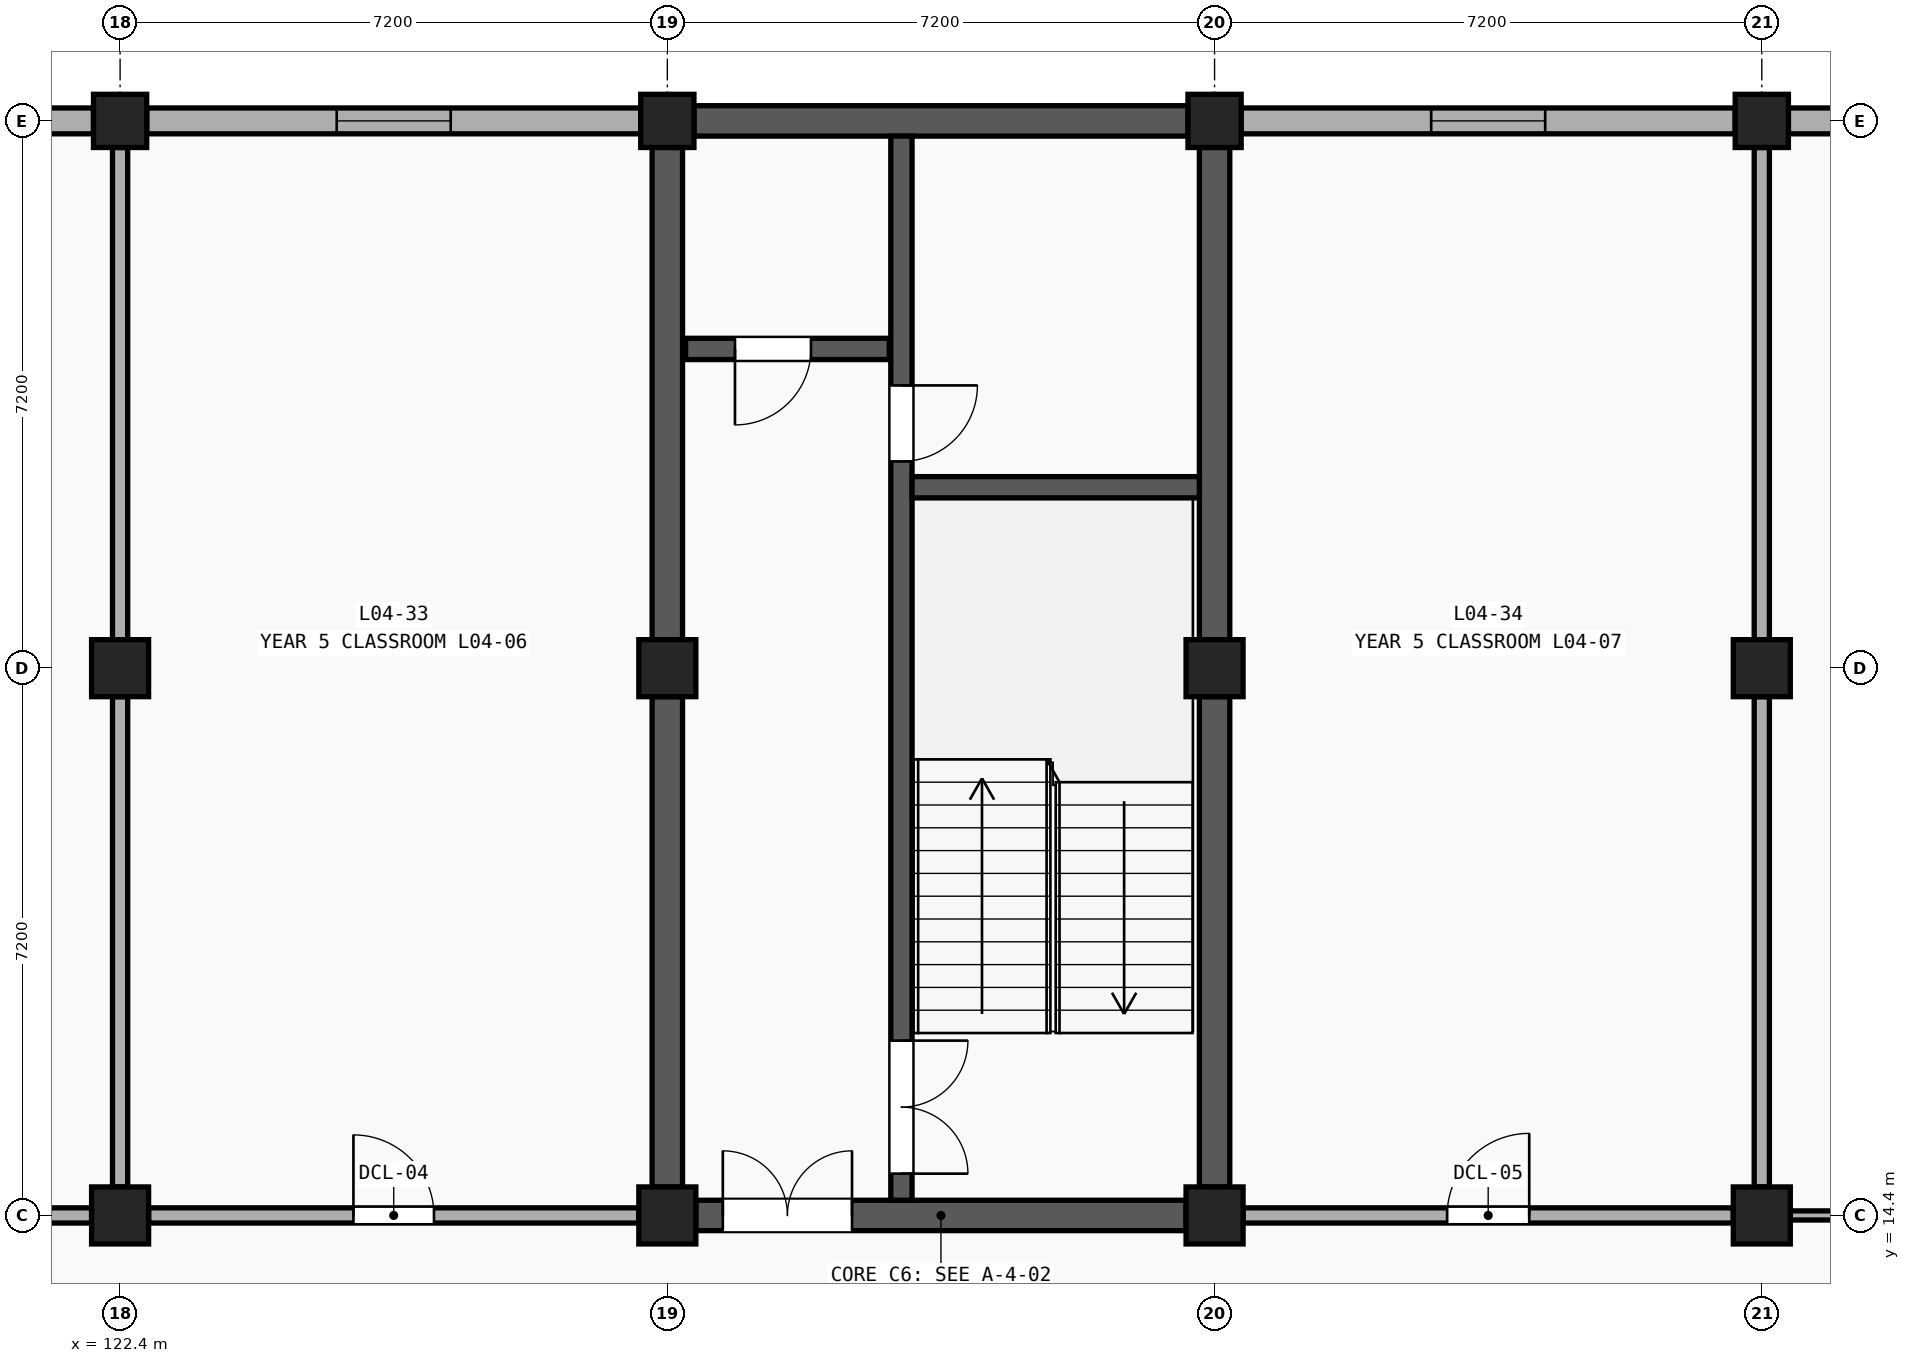
"""IFC4 building model, lengths in metres.
Left out: names, types, materials, properties, quantities, classifications, styles, units other than length and angle.
Written with IfcOpenShell. Run it as: python <this file> out.ifc"""

import sys

from ifc_helpers import new_model, si_unit, direction, frame, frame_2d, origin, origin_2d, place, context, subcontext, project, spatial, rectangle, extrude, element, fill, save


model = new_model("IFC4")
c1 = context("Model", 3, precision=1e-05, world=origin(), true_north=direction((0.0, 1.0)))
c2 = subcontext(c1, "Body", "Model", "MODEL_VIEW")
j1 = project(units=[si_unit("LENGTHUNIT", "METRE"), si_unit("PLANEANGLEUNIT", "RADIAN")], contexts=[c1])
p1 = place(None, origin())
s1 = spatial("IfcSite", under=j1, at=p1, CompositionType="ELEMENT")
p2 = place(p1, origin())
s2 = spatial("IfcBuilding", under=s1, at=p2, CompositionType="ELEMENT")
p3 = place(p2, frame((0.0, 0.0, 18.6)))
s3 = spatial("IfcBuildingStorey", under=s2, at=p3, CompositionType="ELEMENT", Elevation=18.6)
for number, where, z_axis, x_axis in (
    (1, (122.4, 14.4, 0.0), (0.0, 0.0, 1.0), (1.0, 0.0, 0.0)),
    (2, (122.4, 21.6, 0.0), (0.0, 0.0, 1.0), (1.0, 0.0, 0.0)),
):
    element("IfcColumn", number, at=place(p3, frame(where, z_axis=z_axis, x_axis=x_axis)), inside=s3, PredefinedType="COLUMN", context=c2, shape_type="SweptSolid", body=[
        extrude(rectangle(XDim=0.75, YDim=0.75, at=origin_2d()), origin(), (0.0, 0.0, 1.0), 4.0),
    ])
p4 = place(p3, frame((122.4, 28.8, 0.0), z_axis=(0.0, 0.0, 1.0), x_axis=(1.0, 0.0, 0.0)))
e3 = element("IfcColumn", 3, at=p4, inside=s3, PredefinedType="COLUMN", context=c2, shape_type="SweptSolid", body=[
    extrude(rectangle(XDim=0.7, YDim=0.7, at=origin_2d()), origin(), (0.0, 0.0, 1.0), 4.0),
])
for number, where, z_axis, x_axis in (
    (4, (129.6, 14.4, 0.0), (0.0, 0.0, 1.0), (1.0, 0.0, 0.0)),
    (5, (129.6, 21.6, 0.0), (0.0, 0.0, 1.0), (1.0, 0.0, 0.0)),
):
    element("IfcColumn", number, at=place(p3, frame(where, z_axis=z_axis, x_axis=x_axis)), inside=s3, PredefinedType="COLUMN", context=c2, shape_type="SweptSolid", body=[
        extrude(rectangle(XDim=0.75, YDim=0.75, at=origin_2d()), origin(), (0.0, 0.0, 1.0), 4.0),
    ])
p5 = place(p3, frame((129.6, 28.8, 0.0), z_axis=(0.0, 0.0, 1.0), x_axis=(1.0, 0.0, 0.0)))
e6 = element("IfcColumn", 6, at=p5, inside=s3, PredefinedType="COLUMN", context=c2, shape_type="SweptSolid", body=[
    extrude(rectangle(XDim=0.7, YDim=0.7, at=origin_2d()), origin(), (0.0, 0.0, 1.0), 4.0),
])
for number, where, z_axis, x_axis in (
    (7, (136.8, 14.4, 0.0), (0.0, 0.0, 1.0), (1.0, 0.0, 0.0)),
    (8, (136.8, 21.6, 0.0), (0.0, 0.0, 1.0), (1.0, 0.0, 0.0)),
):
    element("IfcColumn", number, at=place(p3, frame(where, z_axis=z_axis, x_axis=x_axis)), inside=s3, PredefinedType="COLUMN", context=c2, shape_type="SweptSolid", body=[
        extrude(rectangle(XDim=0.75, YDim=0.75, at=origin_2d()), origin(), (0.0, 0.0, 1.0), 4.0),
    ])
p6 = place(p3, frame((136.8, 28.8, 0.0), z_axis=(0.0, 0.0, 1.0), x_axis=(1.0, 0.0, 0.0)))
e9 = element("IfcColumn", 9, at=p6, inside=s3, PredefinedType="COLUMN", context=c2, shape_type="SweptSolid", body=[
    extrude(rectangle(XDim=0.7, YDim=0.7, at=origin_2d()), origin(), (0.0, 0.0, 1.0), 4.0),
])
for number, where, z_axis, x_axis in (
    (10, (144.0, 14.4, 0.0), (0.0, 0.0, 1.0), (1.0, 0.0, 0.0)),
    (11, (144.0, 21.6, 0.0), (0.0, 0.0, 1.0), (1.0, 0.0, 0.0)),
):
    element("IfcColumn", number, at=place(p3, frame(where, z_axis=z_axis, x_axis=x_axis)), inside=s3, PredefinedType="COLUMN", context=c2, shape_type="SweptSolid", body=[
        extrude(rectangle(XDim=0.75, YDim=0.75, at=origin_2d()), origin(), (0.0, 0.0, 1.0), 4.0),
    ])
p7 = place(p3, frame((144.0, 28.8, 0.0), z_axis=(0.0, 0.0, 1.0), x_axis=(1.0, 0.0, 0.0)))
e12 = element("IfcColumn", 12, at=p7, inside=s3, PredefinedType="COLUMN", context=c2, shape_type="SweptSolid", body=[
    extrude(rectangle(XDim=0.7, YDim=0.7, at=origin_2d()), origin(), (0.0, 0.0, 1.0), 4.0),
])
p8 = place(p3, frame((115.45, 28.8, 0.0), z_axis=(0.0, 0.0, 1.0), x_axis=(1.0, 0.0, 0.0)))
e13 = element("IfcWall", 13, at=p8, inside=s3, PredefinedType="SOLIDWALL", context=c2, shape_type="SweptSolid", body=[
    extrude(rectangle(XDim=6.6, YDim=0.34, at=frame_2d((3.3, 0.0))), origin(), (0.0, 0.0, 1.0), 3.11),
])
p9 = place(p8, frame((2.55, 0.0, 1.1)))
e14 = element("IfcOpeningElement", 14, at=p9, cuts=e13, PredefinedType="OPENING", context=c2, shape_type="SweptSolid", body=[
    extrude(rectangle(XDim=1.5, YDim=1.35, at=frame_2d((0.75, 0.675))), frame((0.0, 0.182, 0.0), z_axis=(0.0, -1.0, 0.0), x_axis=(1.0, 0.0, 0.0)), (0.0, 0.0, 1.0), 0.364),
])
p10 = place(p3, frame((122.75, 28.8, 0.0), z_axis=(0.0, 0.0, 1.0), x_axis=(1.0, 0.0, 0.0)))
e15 = element("IfcWall", 15, at=p10, inside=s3, PredefinedType="SOLIDWALL", context=c2, shape_type="SweptSolid", body=[
    extrude(rectangle(XDim=6.5, YDim=0.34, at=frame_2d((3.25, 0.0))), origin(), (0.0, 0.0, 1.0), 3.11),
])
p11 = place(p10, frame((2.5, 0.0, 1.1)))
e16 = element("IfcOpeningElement", 16, at=p11, cuts=e15, PredefinedType="OPENING", context=c2, shape_type="SweptSolid", body=[
    extrude(rectangle(XDim=1.5, YDim=1.35, at=frame_2d((0.75, 0.675))), frame((0.0, 0.182, 0.0), z_axis=(0.0, -1.0, 0.0), x_axis=(1.0, 0.0, 0.0)), (0.0, 0.0, 1.0), 0.364),
])
p12 = place(p3, frame((137.15, 28.8, 0.0), z_axis=(0.0, 0.0, 1.0), x_axis=(1.0, 0.0, 0.0)))
e17 = element("IfcWall", 17, at=p12, inside=s3, PredefinedType="SOLIDWALL", context=c2, shape_type="SweptSolid", body=[
    extrude(rectangle(XDim=6.5, YDim=0.34, at=frame_2d((3.25, 0.0))), origin(), (0.0, 0.0, 1.0), 3.11),
])
p13 = place(p12, frame((2.5, 0.0, 1.1)))
e18 = element("IfcOpeningElement", 18, at=p13, cuts=e17, PredefinedType="OPENING", context=c2, shape_type="SweptSolid", body=[
    extrude(rectangle(XDim=1.5, YDim=1.35, at=frame_2d((0.75, 0.675))), frame((0.0, 0.182, 0.0), z_axis=(0.0, -1.0, 0.0), x_axis=(1.0, 0.0, 0.0)), (0.0, 0.0, 1.0), 0.364),
])
p14 = place(p3, frame((144.35, 28.8, 0.0), z_axis=(0.0, 0.0, 1.0), x_axis=(1.0, 0.0, 0.0)))
e19 = element("IfcWall", 19, at=p14, inside=s3, PredefinedType="SOLIDWALL", context=c2, shape_type="SweptSolid", body=[
    extrude(rectangle(XDim=6.6, YDim=0.34, at=frame_2d((3.3, 0.0))), origin(), (0.0, 0.0, 1.0), 3.11),
])
p15 = place(p14, frame((2.55, 0.0, 1.1)))
e20 = element("IfcOpeningElement", 20, at=p15, cuts=e19, PredefinedType="OPENING", context=c2, shape_type="SweptSolid", body=[
    extrude(rectangle(XDim=1.5, YDim=1.35, at=frame_2d((0.75, 0.675))), frame((0.0, 0.182, 0.0), z_axis=(0.0, -1.0, 0.0), x_axis=(1.0, 0.0, 0.0)), (0.0, 0.0, 1.0), 0.364),
])
p16 = place(p3, frame((129.6, 14.775, 0.0), z_axis=(0.0, 0.0, 1.0), x_axis=(0.0, 1.0, 0.0)))
e21 = element("IfcWall", 21, at=p16, inside=s3, PredefinedType="SHEAR", context=c2, shape_type="SweptSolid", body=[
    extrude(rectangle(XDim=6.45, YDim=0.4, at=frame_2d((3.225, 0.0))), origin(), (0.0, 0.0, 1.0), 2.97),
])
p17 = place(p3, frame((129.6, 21.975, 0.0), z_axis=(0.0, 0.0, 1.0), x_axis=(0.0, 1.0, 0.0)))
e22 = element("IfcWall", 22, at=p17, inside=s3, PredefinedType="SHEAR", context=c2, shape_type="SweptSolid", body=[
    extrude(rectangle(XDim=6.475, YDim=0.4, at=frame_2d((3.237, 0.0))), origin(), (0.0, 0.0, 1.0), 2.97),
])
p18 = place(p3, frame((136.8, 14.775, 0.0), z_axis=(0.0, 0.0, 1.0), x_axis=(0.0, 1.0, 0.0)))
e23 = element("IfcWall", 23, at=p18, inside=s3, PredefinedType="SHEAR", context=c2, shape_type="SweptSolid", body=[
    extrude(rectangle(XDim=6.45, YDim=0.4, at=frame_2d((3.225, 0.0))), origin(), (0.0, 0.0, 1.0), 2.97),
])
p19 = place(p3, frame((136.8, 21.975, 0.0), z_axis=(0.0, 0.0, 1.0), x_axis=(0.0, 1.0, 0.0)))
e24 = element("IfcWall", 24, at=p19, inside=s3, PredefinedType="SHEAR", context=c2, shape_type="SweptSolid", body=[
    extrude(rectangle(XDim=6.475, YDim=0.4, at=frame_2d((3.237, 0.0))), origin(), (0.0, 0.0, 1.0), 2.97),
])
p20 = place(p3, frame((129.975, 14.4, 0.0), z_axis=(0.0, 0.0, 1.0), x_axis=(1.0, 0.0, 0.0)))
e25 = element("IfcWall", 25, at=p20, inside=s3, PredefinedType="SHEAR", context=c2, shape_type="SweptSolid", body=[
    extrude(rectangle(XDim=6.45, YDim=0.4, at=frame_2d((3.225, 0.0))), origin(), (0.0, 0.0, 1.0), 3.04),
])
p21 = place(p20, frame((0.355, 0.0, 0.0)))
e26 = element("IfcOpeningElement", 26, at=p21, cuts=e25, PredefinedType="OPENING", context=c2, shape_type="SweptSolid", body=[
    extrude(rectangle(XDim=1.7, YDim=2.25, at=frame_2d((0.85, 1.125))), frame((0.0, 0.212, 0.0), z_axis=(0.0, -1.0, 0.0), x_axis=(1.0, 0.0, 0.0)), (0.0, 0.0, 1.0), 0.424),
])
p22 = place(p3, frame((129.95, 28.8, 0.0), z_axis=(0.0, 0.0, 1.0), x_axis=(1.0, 0.0, 0.0)))
e27 = element("IfcWall", 27, at=p22, inside=s3, PredefinedType="SHEAR", context=c2, shape_type="SweptSolid", body=[
    extrude(rectangle(XDim=6.5, YDim=0.4, at=frame_2d((3.25, 0.0))), origin(), (0.0, 0.0, 1.0), 3.11),
])
p23 = place(p3, frame((132.68, 14.6, 0.0), z_axis=(0.0, 0.0, 1.0), x_axis=(0.0, 1.0, 0.0)))
e28 = element("IfcWall", 28, at=p23, inside=s3, PredefinedType="SHEAR", context=c2, shape_type="SweptSolid", body=[
    extrude(rectangle(XDim=14.0, YDim=0.28, at=frame_2d((7.0, 0.0))), origin(), (0.0, 0.0, 1.0), 3.74),
])
p24 = place(p23, frame((0.35, 0.0, 0.0)))
e29 = element("IfcOpeningElement", 29, at=p24, cuts=e28, PredefinedType="OPENING", context=c2, shape_type="SweptSolid", body=[
    extrude(rectangle(XDim=1.75, YDim=2.15, at=frame_2d((0.875, 1.075))), frame((0.0, 0.152, 0.0), z_axis=(0.0, -1.0, 0.0), x_axis=(1.0, 0.0, 0.0)), (0.0, 0.0, 1.0), 0.304),
])
p25 = place(p23, frame((9.72, 0.0, 0.0)))
e30 = element("IfcOpeningElement", 30, at=p25, cuts=e28, PredefinedType="OPENING", context=c2, shape_type="SweptSolid", body=[
    extrude(rectangle(XDim=1.0, YDim=2.15, at=frame_2d((0.5, 1.075))), frame((0.0, 0.152, 0.0), z_axis=(0.0, -1.0, 0.0), x_axis=(1.0, 0.0, 0.0)), (0.0, 0.0, 1.0), 0.304),
])
p26 = place(p3, frame((132.82, 23.98, 0.0), z_axis=(0.0, 0.0, 1.0), x_axis=(1.0, 0.0, 0.0)))
e31 = element("IfcWall", 31, at=p26, inside=s3, PredefinedType="SHEAR", context=c2, shape_type="SweptSolid", body=[
    extrude(rectangle(XDim=3.78, YDim=0.28, at=frame_2d((1.89, 0.0))), origin(), (0.0, 0.0, 1.0), 3.74),
])
p27 = place(p3, frame((129.84, 25.8, 0.0), z_axis=(0.0, 0.0, 1.0), x_axis=(1.0, 0.0, 0.0)))
e32 = element("IfcWall", 32, at=p27, inside=s3, PredefinedType="SHEAR", context=c2, shape_type="SweptSolid", body=[
    extrude(rectangle(XDim=2.68, YDim=0.28, at=frame_2d((1.34, 0.0))), origin(), (0.0, 0.0, 1.0), 3.74),
])
p28 = place(p27, frame((0.65, 0.0, 0.0)))
e33 = element("IfcOpeningElement", 33, at=p28, cuts=e32, PredefinedType="OPENING", context=c2, shape_type="SweptSolid", body=[
    extrude(rectangle(XDim=1.0, YDim=2.15, at=frame_2d((0.5, 1.075))), frame((0.0, 0.152, 0.0), z_axis=(0.0, -1.0, 0.0), x_axis=(1.0, 0.0, 0.0)), (0.0, 0.0, 1.0), 0.304),
])
p29 = place(p3, frame((115.575, 14.4, 0.0), z_axis=(0.0, 0.0, 1.0), x_axis=(1.0, 0.0, 0.0)))
e34 = element("IfcWall", 34, at=p29, inside=s3, PredefinedType="PARTITIONING", context=c2, shape_type="SweptSolid", body=[
    extrude(rectangle(XDim=6.45, YDim=0.2, at=frame_2d((3.225, 0.0))), origin(), (0.0, 0.0, 1.0), 2.97),
])
p30 = place(p29, frame((2.705, 0.0, 0.0)))
e35 = element("IfcOpeningElement", 35, at=p30, cuts=e34, PredefinedType="OPENING", context=c2, shape_type="SweptSolid", body=[
    extrude(rectangle(XDim=1.04, YDim=2.14, at=frame_2d((0.52, 1.07))), frame((0.0, 0.112, 0.0), z_axis=(0.0, -1.0, 0.0), x_axis=(1.0, 0.0, 0.0)), (0.0, 0.0, 1.0), 0.224),
])
p31 = place(p3, frame((122.4, 14.775, 0.0), z_axis=(0.0, 0.0, 1.0), x_axis=(0.0, 1.0, 0.0)))
e36 = element("IfcWall", 36, at=p31, inside=s3, PredefinedType="PARTITIONING", context=c2, shape_type="SweptSolid", body=[
    extrude(rectangle(XDim=6.45, YDim=0.2, at=frame_2d((3.225, 0.0))), origin(), (0.0, 0.0, 1.0), 2.97),
])
p32 = place(p3, frame((122.4, 21.975, 0.0), z_axis=(0.0, 0.0, 1.0), x_axis=(0.0, 1.0, 0.0)))
e37 = element("IfcWall", 37, at=p32, inside=s3, PredefinedType="PARTITIONING", context=c2, shape_type="SweptSolid", body=[
    extrude(rectangle(XDim=6.475, YDim=0.2, at=frame_2d((3.237, 0.0))), origin(), (0.0, 0.0, 1.0), 2.97),
])
p33 = place(p3, frame((122.775, 14.4, 0.0), z_axis=(0.0, 0.0, 1.0), x_axis=(1.0, 0.0, 0.0)))
e38 = element("IfcWall", 38, at=p33, inside=s3, PredefinedType="PARTITIONING", context=c2, shape_type="SweptSolid", body=[
    extrude(rectangle(XDim=6.45, YDim=0.2, at=frame_2d((3.225, 0.0))), origin(), (0.0, 0.0, 1.0), 2.97),
])
p34 = place(p33, frame((2.695, 0.0, 0.0)))
e39 = element("IfcOpeningElement", 39, at=p34, cuts=e38, PredefinedType="OPENING", context=c2, shape_type="SweptSolid", body=[
    extrude(rectangle(XDim=1.06, YDim=2.16, at=frame_2d((0.53, 1.08))), frame((0.0, 0.112, 0.0), z_axis=(0.0, -1.0, 0.0), x_axis=(1.0, 0.0, 0.0)), (0.0, 0.0, 1.0), 0.224),
])
p35 = place(p3, frame((137.175, 14.4, 0.0), z_axis=(0.0, 0.0, 1.0), x_axis=(1.0, 0.0, 0.0)))
e40 = element("IfcWall", 40, at=p35, inside=s3, PredefinedType="PARTITIONING", context=c2, shape_type="SweptSolid", body=[
    extrude(rectangle(XDim=6.45, YDim=0.2, at=frame_2d((3.225, 0.0))), origin(), (0.0, 0.0, 1.0), 2.97),
])
p36 = place(p35, frame((2.685, 0.0, 0.0)))
e41 = element("IfcOpeningElement", 41, at=p36, cuts=e40, PredefinedType="OPENING", context=c2, shape_type="SweptSolid", body=[
    extrude(rectangle(XDim=1.08, YDim=2.18, at=frame_2d((0.54, 1.09))), frame((0.0, 0.112, 0.0), z_axis=(0.0, -1.0, 0.0), x_axis=(1.0, 0.0, 0.0)), (0.0, 0.0, 1.0), 0.224),
])
p37 = place(p3, frame((144.0, 14.775, 0.0), z_axis=(0.0, 0.0, 1.0), x_axis=(0.0, 1.0, 0.0)))
e42 = element("IfcWall", 42, at=p37, inside=s3, PredefinedType="PARTITIONING", context=c2, shape_type="SweptSolid", body=[
    extrude(rectangle(XDim=6.45, YDim=0.2, at=frame_2d((3.225, 0.0))), origin(), (0.0, 0.0, 1.0), 2.97),
])
p38 = place(p3, frame((144.0, 21.975, 0.0), z_axis=(0.0, 0.0, 1.0), x_axis=(0.0, 1.0, 0.0)))
e43 = element("IfcWall", 43, at=p38, inside=s3, PredefinedType="PARTITIONING", context=c2, shape_type="SweptSolid", body=[
    extrude(rectangle(XDim=6.475, YDim=0.2, at=frame_2d((3.237, 0.0))), origin(), (0.0, 0.0, 1.0), 2.97),
])
p39 = place(p3, frame((144.375, 14.4, 0.0), z_axis=(0.0, 0.0, 1.0), x_axis=(1.0, 0.0, 0.0)))
e44 = element("IfcWall", 44, at=p39, inside=s3, PredefinedType="MOVABLE", context=c2, shape_type="SweptSolid", body=[
    extrude(rectangle(XDim=6.45, YDim=0.12, at=frame_2d((3.225, 0.0))), origin(), (0.0, 0.0, 1.0), 2.97),
])
p40 = place(p39, frame((2.665, 0.0, 0.0)))
e45 = element("IfcOpeningElement", 45, at=p40, cuts=e44, PredefinedType="OPENING", context=c2, shape_type="SweptSolid", body=[
    extrude(rectangle(XDim=1.12, YDim=2.2, at=frame_2d((0.56, 1.1))), frame((0.0, 0.072, 0.0), z_axis=(0.0, -1.0, 0.0), x_axis=(1.0, 0.0, 0.0)), (0.0, 0.0, 1.0), 0.144),
])
p41 = place(p11, origin())
e46 = element("IfcWindow", 46, at=p41, inside=s3, PartitioningType="SINGLE_PANEL", PredefinedType="WINDOW", context=c2, shape_type="SweptSolid", body=[
    extrude(rectangle(XDim=1.5, YDim=1.35, at=frame_2d((0.75, 0.675))), frame((0.0, 0.03, 0.0), z_axis=(0.0, -1.0, 0.0), x_axis=(1.0, 0.0, 0.0)), (0.0, 0.0, 1.0), 0.06),
])
fill(e16, e46)
p42 = place(p13, origin())
e47 = element("IfcWindow", 47, at=p42, inside=s3, PartitioningType="SINGLE_PANEL", PredefinedType="WINDOW", context=c2, shape_type="SweptSolid", body=[
    extrude(rectangle(XDim=1.5, YDim=1.35, at=frame_2d((0.75, 0.675))), frame((0.0, 0.03, 0.0), z_axis=(0.0, -1.0, 0.0), x_axis=(1.0, 0.0, 0.0)), (0.0, 0.0, 1.0), 0.06),
])
fill(e18, e47)
p43 = place(p21, origin())
e48 = element("IfcDoor", 48, at=p43, inside=s3, OperationType="DOUBLE_DOOR_SINGLE_SWING", PredefinedType="DOOR", context=c2, shape_type="SweptSolid", body=[
    extrude(rectangle(XDim=1.7, YDim=2.25, at=frame_2d((0.85, 1.125))), frame((0.0, 0.025, 0.0), z_axis=(0.0, -1.0, 0.0), x_axis=(1.0, 0.0, 0.0)), (0.0, 0.0, 1.0), 0.05),
])
fill(e26, e48)
p44 = place(p24, frame((1.75, 0.0, 0.0), z_axis=(0.0, 0.0, 1.0), x_axis=(-1.0, 0.0, 0.0)))
e49 = element("IfcDoor", 49, at=p44, inside=s3, OperationType="DOUBLE_DOOR_SINGLE_SWING", PredefinedType="DOOR", context=c2, shape_type="SweptSolid", body=[
    extrude(rectangle(XDim=1.75, YDim=2.15, at=frame_2d((0.875, 1.075))), frame((0.0, 0.025, 0.0), z_axis=(0.0, -1.0, 0.0), x_axis=(1.0, 0.0, 0.0)), (0.0, 0.0, 1.0), 0.05),
])
fill(e29, e49)
p45 = place(p25, frame((1.0, 0.0, 0.0), z_axis=(0.0, 0.0, 1.0), x_axis=(-1.0, 0.0, 0.0)))
e50 = element("IfcDoor", 50, at=p45, inside=s3, OperationType="SINGLE_SWING_LEFT", PredefinedType="DOOR", context=c2, shape_type="SweptSolid", body=[
    extrude(rectangle(XDim=1.0, YDim=2.15, at=frame_2d((0.5, 1.075))), frame((0.0, 0.025, 0.0), z_axis=(0.0, -1.0, 0.0), x_axis=(1.0, 0.0, 0.0)), (0.0, 0.0, 1.0), 0.05),
])
fill(e30, e50)
p46 = place(p28, frame((1.0, 0.0, 0.0), z_axis=(0.0, 0.0, 1.0), x_axis=(-1.0, 0.0, 0.0)))
e51 = element("IfcDoor", 51, at=p46, inside=s3, OperationType="SINGLE_SWING_RIGHT", PredefinedType="DOOR", context=c2, shape_type="SweptSolid", body=[
    extrude(rectangle(XDim=1.0, YDim=2.15, at=frame_2d((0.5, 1.075))), frame((0.0, 0.025, 0.0), z_axis=(0.0, -1.0, 0.0), x_axis=(1.0, 0.0, 0.0)), (0.0, 0.0, 1.0), 0.05),
])
fill(e33, e51)
p47 = place(p34, origin())
e52 = element("IfcDoor", 52, at=p47, inside=s3, OperationType="SINGLE_SWING_LEFT", PredefinedType="DOOR", context=c2, shape_type="SweptSolid", body=[
    extrude(rectangle(XDim=1.06, YDim=2.16, at=frame_2d((0.53, 1.08))), frame((0.0, 0.025, 0.0), z_axis=(0.0, -1.0, 0.0), x_axis=(1.0, 0.0, 0.0)), (0.0, 0.0, 1.0), 0.05),
])
fill(e39, e52)
p48 = place(p36, origin())
e53 = element("IfcDoor", 53, at=p48, inside=s3, OperationType="SINGLE_SWING_RIGHT", PredefinedType="DOOR", context=c2, shape_type="SweptSolid", body=[
    extrude(rectangle(XDim=1.08, YDim=2.18, at=frame_2d((0.54, 1.09))), frame((0.0, 0.025, 0.0), z_axis=(0.0, -1.0, 0.0), x_axis=(1.0, 0.0, 0.0)), (0.0, 0.0, 1.0), 0.05),
])
fill(e41, e53)
save(model, sys.argv[1])
